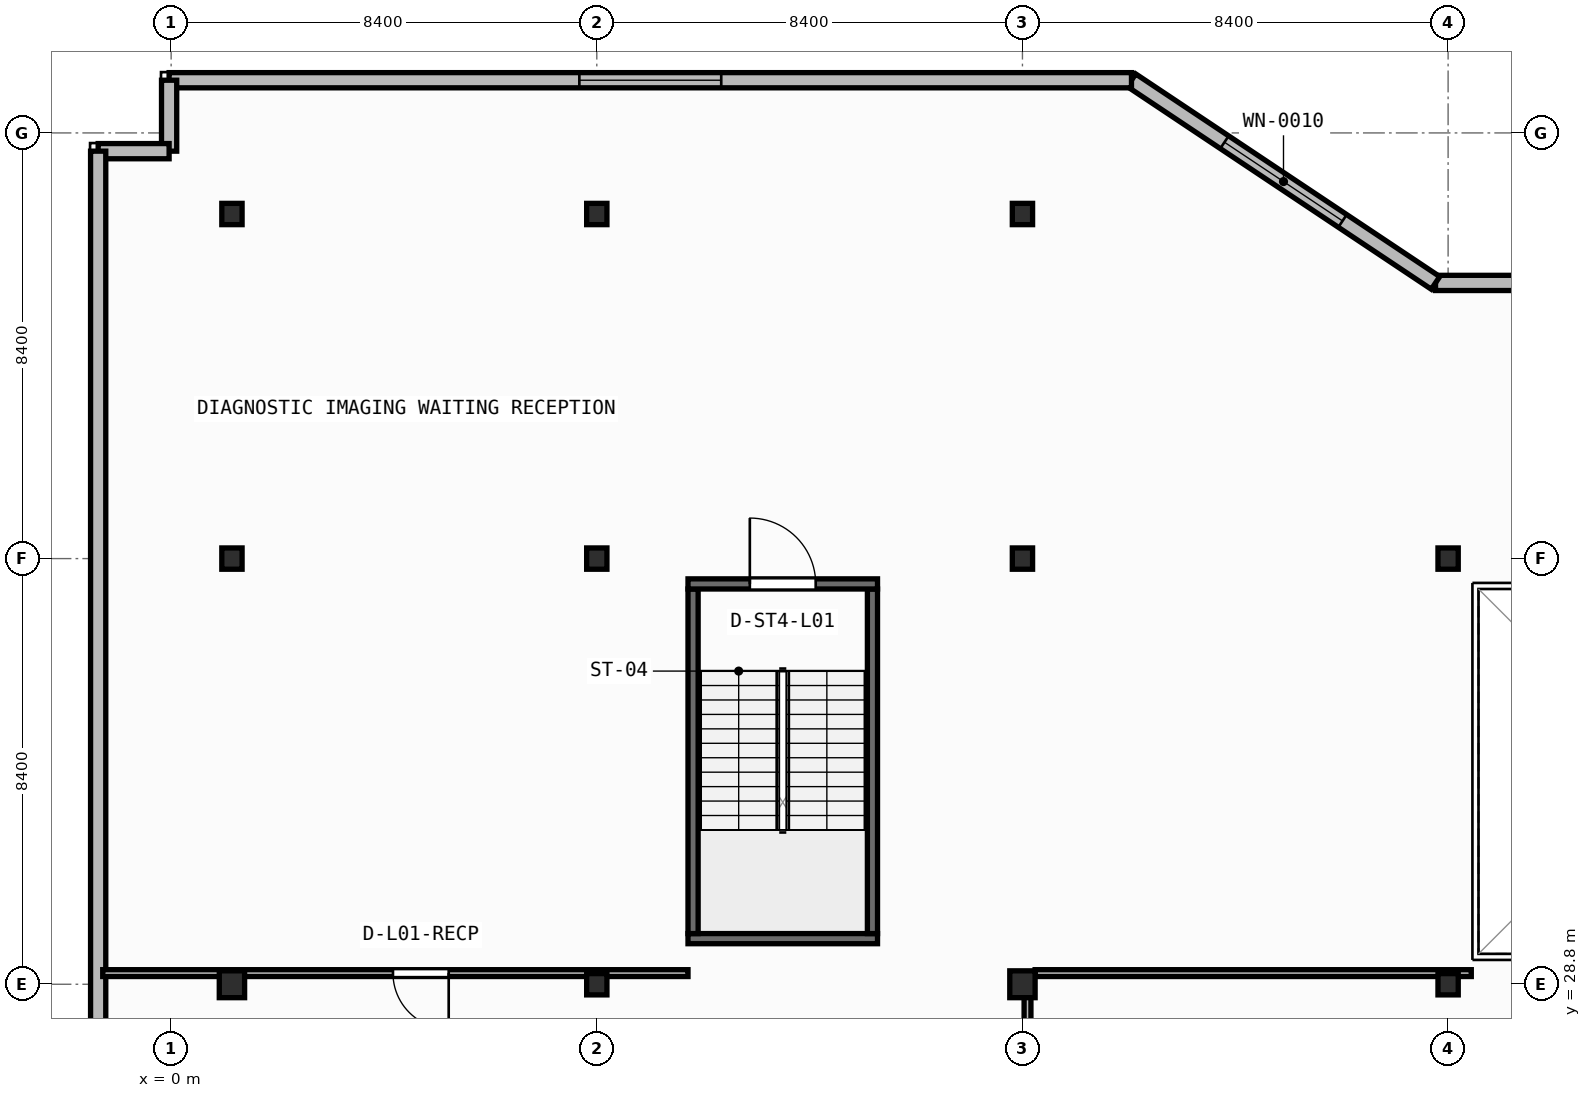
"""IFC4 building model, lengths in metres.
Left out: names, types, materials, properties, quantities, classifications, styles, units other than length and angle.
Written with IfcOpenShell. Run it as: python <this file> out.ifc"""

import sys

from ifc_helpers import new_model, si_unit, direction, frame, frame_2d, origin, origin_2d, place, context, subcontext, project, spatial, rectangle, i_section, extrude, element, fill, save


model = new_model("IFC4")
c1 = context("Model", 3, precision=1e-05, world=origin(), true_north=direction((0.0, 1.0)))
c2 = subcontext(c1, "Body", "Model", "MODEL_VIEW")
j1 = project(units=[si_unit("LENGTHUNIT", "METRE"), si_unit("PLANEANGLEUNIT", "RADIAN")], contexts=[c1])
p1 = place(None, origin())
s1 = spatial("IfcSite", under=j1, at=p1, CompositionType="ELEMENT")
p2 = place(p1, origin())
s2 = spatial("IfcBuilding", under=s1, at=p2, CompositionType="ELEMENT")
p3 = place(p2, frame((0.0, 0.0, 4.5)))
s3 = spatial("IfcBuildingStorey", under=s2, at=p3, CompositionType="ELEMENT", Elevation=4.5)
p4 = place(p3, frame((1.2, 28.8, 0.0), z_axis=(0.0, 0.0, 1.0), x_axis=(1.0, 0.0, 0.0)))
e1 = element("IfcColumn", 1, at=p4, inside=s3, PredefinedType="COLUMN", context=c2, shape_type="SweptSolid", body=[
    extrude(i_section(OverallWidth=0.5, OverallDepth=0.53, WebThickness=0.028, FlangeThickness=0.045, at=origin_2d()), origin(), (0.0, 0.0, 1.0), 4.5),
])
p5 = place(p3, frame((8.4, 28.8, 0.0), z_axis=(0.0, 0.0, 1.0), x_axis=(1.0, 0.0, 0.0)))
e2 = element("IfcColumn", 2, at=p5, inside=s3, PredefinedType="COLUMN", context=c2, shape_type="SweptSolid", body=[
    extrude(i_section(OverallWidth=0.4, OverallDepth=0.42, WebThickness=0.025, FlangeThickness=0.04, at=origin_2d()), origin(), (0.0, 0.0, 1.0), 4.5),
])
p6 = place(p3, frame((16.8, 28.8, 0.0), z_axis=(0.0, 0.0, 1.0), x_axis=(1.0, 0.0, 0.0)))
e3 = element("IfcColumn", 3, at=p6, inside=s3, PredefinedType="COLUMN", context=c2, shape_type="SweptSolid", body=[
    extrude(i_section(OverallWidth=0.5, OverallDepth=0.53, WebThickness=0.028, FlangeThickness=0.045, at=origin_2d()), origin(), (0.0, 0.0, 1.0), 4.5),
])
for number, where, z_axis, x_axis in (
    (4, (25.2, 28.8, 0.0), (0.0, 0.0, 1.0), (1.0, 0.0, 0.0)),
    (5, (1.2, 37.2, 0.0), (0.0, 0.0, 1.0), (1.0, 0.0, 0.0)),
    (6, (8.4, 37.2, 0.0), (0.0, 0.0, 1.0), (1.0, 0.0, 0.0)),
    (7, (16.8, 37.2, 0.0), (0.0, 0.0, 1.0), (1.0, 0.0, 0.0)),
    (8, (25.2, 37.2, 0.0), (0.0, 0.0, 1.0), (1.0, 0.0, 0.0)),
    (9, (1.2, 44.0, 0.0), (0.0, 0.0, 1.0), (1.0, 0.0, 0.0)),
    (10, (8.4, 44.0, 0.0), (0.0, 0.0, 1.0), (1.0, 0.0, 0.0)),
    (11, (16.8, 44.0, 0.0), (0.0, 0.0, 1.0), (1.0, 0.0, 0.0)),
):
    element("IfcColumn", number, at=place(p3, frame(where, z_axis=z_axis, x_axis=x_axis)), inside=s3, PredefinedType="COLUMN", context=c2, shape_type="SweptSolid", body=[
        extrude(i_section(OverallWidth=0.4, OverallDepth=0.42, WebThickness=0.025, FlangeThickness=0.04, at=origin_2d()), origin(), (0.0, 0.0, 1.0), 4.5),
    ])
p7 = place(p3, frame((43.048, 42.64, 0.0), z_axis=(0.0, 0.0, 1.0), x_axis=(-1.0, 0.0, 0.0)))
e12 = element("IfcWall", 12, at=p7, inside=s3, PredefinedType="STANDARD", context=c2, shape_type="SweptSolid", body=[
    extrude(rectangle(XDim=18.097, YDim=0.3, at=frame_2d((9.048, 0.0))), origin(), (0.0, 0.0, 1.0), 4.25),
])
p8 = place(p7, frame((7.648, 0.0, 0.85)))
e13 = element("IfcOpeningElement", 13, at=p8, cuts=e12, PredefinedType="OPENING", context=c2, shape_type="SweptSolid", body=[
    extrude(rectangle(XDim=2.8, YDim=2.1, at=frame_2d((1.4, 1.05))), frame((0.0, 0.16, 0.0), z_axis=(0.0, -1.0, 0.0), x_axis=(1.0, 0.0, 0.0)), (0.0, 0.0, 1.0), 0.32),
])
p9 = place(p3, frame((24.952, 42.64, 0.0), z_axis=(0.0, 0.0, 1.0), x_axis=(-0.832050294338, 0.554700196225, 0.0)))
e14 = element("IfcWall", 14, at=p9, inside=s3, PredefinedType="STANDARD", context=c2, shape_type="SweptSolid", body=[
    extrude(rectangle(XDim=7.211, YDim=0.3, at=frame_2d((3.605, 0.0))), origin(), (0.0, 0.0, 1.0), 4.25),
])
p10 = place(p9, frame((2.206, 0.0, 0.85)))
e15 = element("IfcOpeningElement", 15, at=p10, cuts=e14, PredefinedType="OPENING", context=c2, shape_type="SweptSolid", body=[
    extrude(rectangle(XDim=2.8, YDim=2.1, at=frame_2d((1.4, 1.05))), frame((0.0, 0.16, 0.0), z_axis=(0.0, -1.0, 0.0), x_axis=(1.0, 0.0, 0.0)), (0.0, 0.0, 1.0), 0.32),
])
p11 = place(p3, frame((18.952, 46.64, 0.0), z_axis=(0.0, 0.0, 1.0), x_axis=(-1.0, 0.0, 0.0)))
e16 = element("IfcWall", 16, at=p11, inside=s3, PredefinedType="STANDARD", context=c2, shape_type="SweptSolid", body=[
    extrude(rectangle(XDim=18.992, YDim=0.3, at=frame_2d((9.496, 0.0))), origin(), (0.0, 0.0, 1.0), 4.25),
])
p12 = place(p11, frame((8.096, 0.0, 0.85)))
e17 = element("IfcOpeningElement", 17, at=p12, cuts=e16, PredefinedType="OPENING", context=c2, shape_type="SweptSolid", body=[
    extrude(rectangle(XDim=2.8, YDim=2.1, at=frame_2d((1.4, 1.05))), frame((0.0, 0.16, 0.0), z_axis=(0.0, -1.0, 0.0), x_axis=(1.0, 0.0, 0.0)), (0.0, 0.0, 1.0), 0.32),
])
for number, where, z_axis, x_axis in (
    (18, (-0.04, 46.64, 0.0), (0.0, 0.0, 1.0), (0.0, -1.0, 0.0)),
    (19, (-0.04, 45.24, 0.0), (0.0, 0.0, 1.0), (-1.0, 0.0, 0.0)),
):
    element("IfcWall", number, at=place(p3, frame(where, z_axis=z_axis, x_axis=x_axis)), inside=s3, PredefinedType="STANDARD", context=c2, shape_type="SweptSolid", body=[
        extrude(rectangle(XDim=1.4, YDim=0.3, at=frame_2d((0.7, 0.0))), origin(), (0.0, 0.0, 1.0), 4.25),
    ])
p13 = place(p3, frame((-1.44, 45.24, 0.0), z_axis=(0.0, 0.0, 1.0), x_axis=(0.0, -1.0, 0.0)))
e20 = element("IfcWall", 20, at=p13, inside=s3, PredefinedType="STANDARD", context=c2, shape_type="SweptSolid", body=[
    extrude(rectangle(XDim=44.48, YDim=0.3, at=frame_2d((22.24, 0.0))), origin(), (0.0, 0.0, 1.0), 4.25),
])
p14 = place(p13, frame((20.84, 0.0, 0.85)))
e21 = element("IfcOpeningElement", 21, at=p14, cuts=e20, PredefinedType="OPENING", context=c2, shape_type="SweptSolid", body=[
    extrude(rectangle(XDim=2.8, YDim=2.1, at=frame_2d((1.4, 1.05))), frame((0.0, 0.16, 0.0), z_axis=(0.0, -1.0, 0.0), x_axis=(1.0, 0.0, 0.0)), (0.0, 0.0, 1.0), 0.32),
])
p15 = place(p3, frame((10.2, 29.7, 0.0), z_axis=(0.0, 0.0, 1.0), x_axis=(1.0, 0.0, 0.0)))
e22 = element("IfcWall", 22, at=p15, inside=s3, PredefinedType="SHEAR", context=c2, shape_type="SweptSolid", body=[
    extrude(rectangle(XDim=3.74, YDim=0.2, at=frame_2d((1.87, 0.0))), origin(), (0.0, 0.0, 1.0), 4.25),
])
for number, where, z_axis, x_axis in (
    (23, (10.3, 29.8, 0.0), (0.0, 0.0, 1.0), (0.0, 1.0, 0.0)),
    (24, (13.84, 29.8, 0.0), (0.0, 0.0, 1.0), (0.0, 1.0, 0.0)),
):
    element("IfcWall", number, at=place(p3, frame(where, z_axis=z_axis, x_axis=x_axis)), inside=s3, PredefinedType="SHEAR", context=c2, shape_type="SweptSolid", body=[
        extrude(rectangle(XDim=6.8, YDim=0.2, at=frame_2d((3.4, 0.0))), origin(), (0.0, 0.0, 1.0), 4.25),
    ])
p16 = place(p3, frame((10.2, 36.7, 0.0), z_axis=(0.0, 0.0, 1.0), x_axis=(1.0, 0.0, 0.0)))
e25 = element("IfcWall", 25, at=p16, inside=s3, PredefinedType="SHEAR", context=c2, shape_type="SweptSolid", body=[
    extrude(rectangle(XDim=3.74, YDim=0.2, at=frame_2d((1.87, 0.0))), origin(), (0.0, 0.0, 1.0), 4.25),
])
p17 = place(p16, frame((1.22, 0.0, 0.0)))
e26 = element("IfcOpeningElement", 26, at=p17, cuts=e25, PredefinedType="OPENING", context=c2, shape_type="SweptSolid", body=[
    extrude(rectangle(XDim=1.3, YDim=2.15, at=frame_2d((0.65, 1.075))), frame((0.0, 0.11, 0.0), z_axis=(0.0, -1.0, 0.0), x_axis=(1.0, 0.0, 0.0)), (0.0, 0.0, 1.0), 0.22),
])
p18 = place(p3, frame((16.9, 14.865, 0.0), z_axis=(0.0, 0.0, 1.0), x_axis=(0.0, 1.0, 0.0)))
e27 = element("IfcWall", 27, at=p18, inside=s3, PredefinedType="PARTITIONING", context=c2, shape_type="SweptSolid", body=[
    extrude(rectangle(XDim=14.155, YDim=0.135, at=frame_2d((7.078, 0.0))), origin(), (0.0, 0.0, 1.0), 3.623),
])
p19 = place(p3, frame((10.2, 29.02, 0.0), z_axis=(0.0, 0.0, 1.0), x_axis=(-1.0, 0.0, 0.0)))
e28 = element("IfcWall", 28, at=p19, inside=s3, PredefinedType="PARTITIONING", context=c2, shape_type="SweptSolid", body=[
    extrude(rectangle(XDim=11.55, YDim=0.135, at=frame_2d((5.775, 0.0))), origin(), (0.0, 0.0, 1.0), 3.425),
])
p20 = place(p19, frame((4.722, 0.0, 0.0)))
e29 = element("IfcOpeningElement", 29, at=p20, cuts=e28, PredefinedType="OPENING", context=c2, shape_type="SweptSolid", body=[
    extrude(rectangle(XDim=1.1, YDim=2.1, at=frame_2d((0.55, 1.05))), frame((0.0, 0.077, 0.0), z_axis=(0.0, -1.0, 0.0), x_axis=(1.0, 0.0, 0.0)), (0.0, 0.0, 1.0), 0.155),
])
p21 = place(p3, frame((25.657, 29.02, 0.0), z_axis=(0.0, 0.0, 1.0), x_axis=(-1.0, 0.0, 0.0)))
e30 = element("IfcWall", 30, at=p21, inside=s3, PredefinedType="PARTITIONING", context=c2, shape_type="SweptSolid", body=[
    extrude(rectangle(XDim=8.607, YDim=0.135, at=frame_2d((4.304, 0.0))), origin(), (0.0, 0.0, 1.0), 3.425),
])
p22 = place(p10, origin())
e31 = element("IfcWindow", 31, at=p22, inside=s3, PartitioningType="SINGLE_PANEL", PredefinedType="WINDOW", context=c2, shape_type="SweptSolid", body=[
    extrude(rectangle(XDim=2.8, YDim=2.1, at=frame_2d((1.4, 1.05))), frame((0.0, 0.03, 0.0), z_axis=(0.0, -1.0, 0.0), x_axis=(1.0, 0.0, 0.0)), (0.0, 0.0, 1.0), 0.06),
])
fill(e15, e31)
p23 = place(p12, origin())
e32 = element("IfcWindow", 32, at=p23, inside=s3, PartitioningType="SINGLE_PANEL", PredefinedType="WINDOW", context=c2, shape_type="SweptSolid", body=[
    extrude(rectangle(XDim=2.8, YDim=2.1, at=frame_2d((1.4, 1.05))), frame((0.0, 0.03, 0.0), z_axis=(0.0, -1.0, 0.0), x_axis=(1.0, 0.0, 0.0)), (0.0, 0.0, 1.0), 0.06),
])
fill(e17, e32)
p24 = place(p17, origin())
e33 = element("IfcDoor", 33, at=p24, inside=s3, OperationType="SINGLE_SWING_LEFT", PredefinedType="DOOR", context=c2, shape_type="SweptSolid", body=[
    extrude(rectangle(XDim=1.3, YDim=2.15, at=frame_2d((0.65, 1.075))), frame((0.0, 0.025, 0.0), z_axis=(0.0, -1.0, 0.0), x_axis=(1.0, 0.0, 0.0)), (0.0, 0.0, 1.0), 0.05),
])
fill(e26, e33)
p25 = place(p20, origin())
e34 = element("IfcDoor", 34, at=p25, inside=s3, OperationType="SINGLE_SWING_LEFT", PredefinedType="DOOR", context=c2, shape_type="SweptSolid", body=[
    extrude(rectangle(XDim=1.1, YDim=2.1, at=frame_2d((0.55, 1.05))), frame((0.0, 0.025, 0.0), z_axis=(0.0, -1.0, 0.0), x_axis=(1.0, 0.0, 0.0)), (0.0, 0.0, 1.0), 0.05),
])
fill(e29, e34)
save(model, sys.argv[1])
